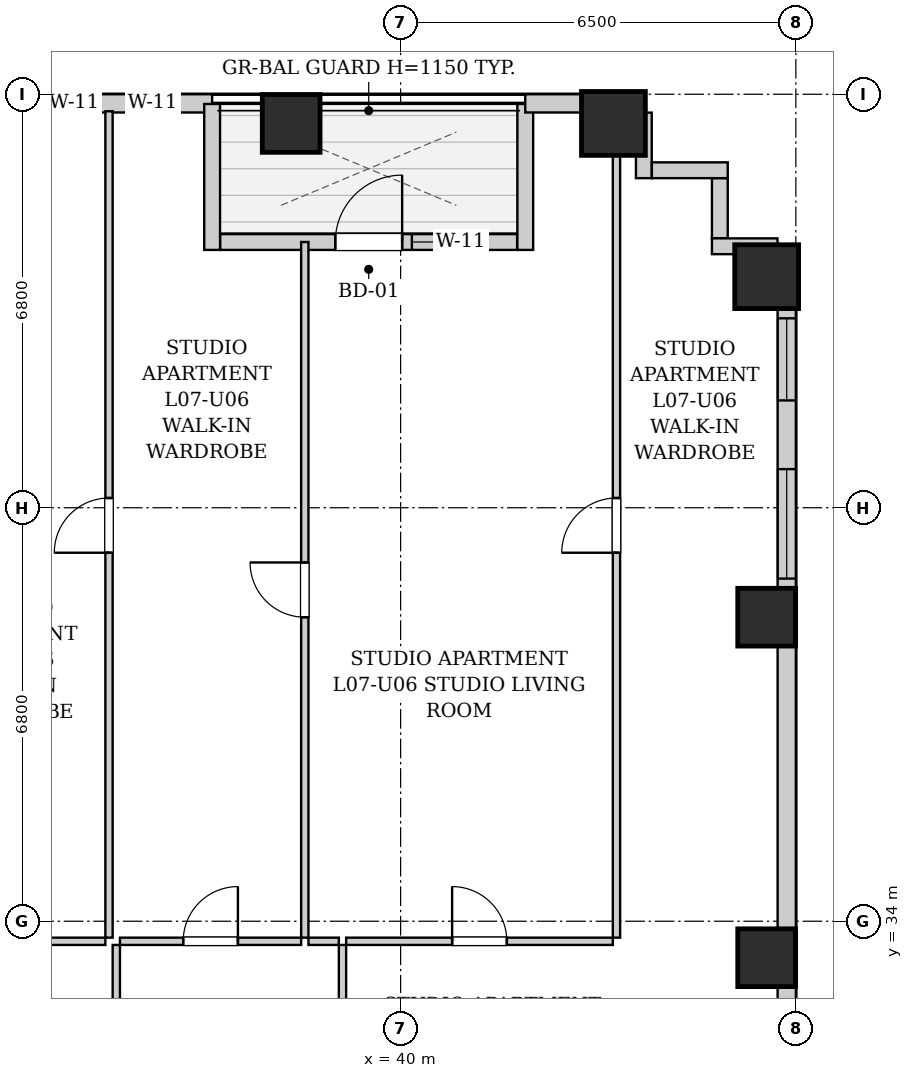
"""IFC4 building model, lengths in metres.
Left out: names, types, materials, properties, quantities, classifications, styles, units other than length and angle.
Written with IfcOpenShell. Run it as: python <this file> out.ifc"""

import sys

from ifc_helpers import new_model, si_unit, direction, frame, frame_2d, origin, origin_2d, place, context, subcontext, project, spatial, rectangle, extrude, element, fill, save


model = new_model("IFC4")
c1 = context("Model", 3, precision=1e-05, world=origin(), true_north=direction((0.0, 1.0)))
c2 = subcontext(c1, "Body", "Model", "MODEL_VIEW")
j1 = project(units=[si_unit("LENGTHUNIT", "METRE"), si_unit("PLANEANGLEUNIT", "RADIAN")], contexts=[c1])
p1 = place(None, origin())
s1 = spatial("IfcSite", under=j1, at=p1, CompositionType="ELEMENT")
p2 = place(p1, origin())
s2 = spatial("IfcBuilding", under=s1, at=p2, CompositionType="ELEMENT")
p3 = place(p2, frame((0.0, 0.0, 32.2)))
s3 = spatial("IfcBuildingStorey", under=s2, at=p3, CompositionType="ELEMENT", Elevation=32.2)
p4 = place(p3, frame((38.2, 47.12, 0.0), z_axis=(0.0, 0.0, 1.0), x_axis=(1.0, 0.0, 0.0)))
e1 = element("IfcColumn", 1, at=p4, inside=s3, PredefinedType="COLUMN", context=c2, shape_type="SweptSolid", body=[
    extrude(rectangle(XDim=0.95, YDim=0.95, at=origin_2d()), origin(), (0.0, 0.0, 1.0), 3.2),
])
p5 = place(p3, frame((43.5, 47.12, 0.0), z_axis=(0.0, 0.0, 1.0), x_axis=(1.0, 0.0, 0.0)))
e2 = element("IfcColumn", 2, at=p5, inside=s3, PredefinedType="COLUMN", context=c2, shape_type="SweptSolid", body=[
    extrude(rectangle(XDim=1.05, YDim=1.05, at=origin_2d()), origin(), (0.0, 0.0, 1.0), 3.2),
])
for number, where, z_axis, x_axis in (
    (3, (46.02, 33.4, 0.0), (0.0, 0.0, 1.0), (1.0, 0.0, 0.0)),
    (4, (46.02, 39.0, 0.0), (0.0, 0.0, 1.0), (1.0, 0.0, 0.0)),
):
    element("IfcColumn", number, at=place(p3, frame(where, z_axis=z_axis, x_axis=x_axis)), inside=s3, PredefinedType="COLUMN", context=c2, shape_type="SweptSolid", body=[
        extrude(rectangle(XDim=0.95, YDim=0.95, at=origin_2d()), origin(), (0.0, 0.0, 1.0), 3.2),
    ])
p6 = place(p3, frame((46.02, 44.6, 0.0), z_axis=(0.0, 0.0, 1.0), x_axis=(1.0, 0.0, 0.0)))
e5 = element("IfcColumn", 5, at=p6, inside=s3, PredefinedType="COLUMN", context=c2, shape_type="SweptSolid", body=[
    extrude(rectangle(XDim=1.05, YDim=1.05, at=origin_2d()), origin(), (0.0, 0.0, 1.0), 3.2),
])
p7 = place(p3, frame((10.0, 47.45, 0.0), z_axis=(0.0, 0.0, 1.0), x_axis=(1.0, 0.0, 0.0)))
e6 = element("IfcWall", 6, at=p7, inside=s3, PredefinedType="SOLIDWALL", context=c2, shape_type="SweptSolid", body=[
    extrude(rectangle(XDim=26.9, YDim=0.3, at=frame_2d((13.45, 0.0))), origin(), (0.0, 0.0, 1.0), 1.975),
])
p8 = place(p7, frame((5.815, 0.0, 0.55)))
e7 = element("IfcOpeningElement", 7, at=p8, cuts=e6, PredefinedType="OPENING", context=c2, shape_type="SweptSolid", body=[
    extrude(rectangle(XDim=1.35, YDim=1.2, at=frame_2d((0.675, 0.6))), frame((0.0, 0.16, 0.0), z_axis=(0.0, -1.0, 0.0), x_axis=(1.0, 0.0, 0.0)), (0.0, 0.0, 1.0), 0.32),
])
p9 = place(p7, frame((9.694, 0.0, 0.55)))
e8 = element("IfcOpeningElement", 8, at=p9, cuts=e6, PredefinedType="OPENING", context=c2, shape_type="SweptSolid", body=[
    extrude(rectangle(XDim=1.8, YDim=1.2, at=frame_2d((0.9, 0.6))), frame((0.0, 0.16, 0.0), z_axis=(0.0, -1.0, 0.0), x_axis=(1.0, 0.0, 0.0)), (0.0, 0.0, 1.0), 0.32),
])
p10 = place(p7, frame((17.5, 0.0, 0.55)))
e9 = element("IfcOpeningElement", 9, at=p10, cuts=e6, PredefinedType="OPENING", context=c2, shape_type="SweptSolid", body=[
    extrude(rectangle(XDim=0.85, YDim=1.2, at=frame_2d((0.425, 0.6))), frame((0.0, 0.16, 0.0), z_axis=(0.0, -1.0, 0.0), x_axis=(1.0, 0.0, 0.0)), (0.0, 0.0, 1.0), 0.32),
])
p11 = place(p7, frame((19.463, 0.0, 0.55)))
e10 = element("IfcOpeningElement", 10, at=p11, cuts=e6, PredefinedType="OPENING", context=c2, shape_type="SweptSolid", body=[
    extrude(rectangle(XDim=1.8, YDim=1.2, at=frame_2d((0.9, 0.6))), frame((0.0, 0.16, 0.0), z_axis=(0.0, -1.0, 0.0), x_axis=(1.0, 0.0, 0.0)), (0.0, 0.0, 1.0), 0.32),
])
p12 = place(p7, frame((23.835, 0.0, 0.55)))
e11 = element("IfcOpeningElement", 11, at=p12, cuts=e6, PredefinedType="OPENING", context=c2, shape_type="SweptSolid", body=[
    extrude(rectangle(XDim=0.85, YDim=1.2, at=frame_2d((0.425, 0.6))), frame((0.0, 0.16, 0.0), z_axis=(0.0, -1.0, 0.0), x_axis=(1.0, 0.0, 0.0)), (0.0, 0.0, 1.0), 0.32),
])
p13 = place(p7, frame((25.498, 0.0, 0.55)))
e12 = element("IfcOpeningElement", 12, at=p13, cuts=e6, PredefinedType="OPENING", context=c2, shape_type="SweptSolid", body=[
    extrude(rectangle(XDim=0.85, YDim=1.2, at=frame_2d((0.425, 0.6))), frame((0.0, 0.16, 0.0), z_axis=(0.0, -1.0, 0.0), x_axis=(1.0, 0.0, 0.0)), (0.0, 0.0, 1.0), 0.32),
])
p14 = place(p3, frame((36.9, 47.44, 0.0), z_axis=(0.0, 0.0, 1.0), x_axis=(0.0, -1.0, 0.0)))
e13 = element("IfcWall", 13, at=p14, inside=s3, PredefinedType="SOLIDWALL", context=c2, shape_type="SweptSolid", body=[
    extrude(rectangle(XDim=2.4, YDim=0.26, at=frame_2d((1.2, 0.0))), origin(), (0.0, 0.0, 1.0), 2.94),
])
p15 = place(p3, frame((37.034, 45.17, 0.0), z_axis=(0.0, 0.0, 1.0), x_axis=(1.0, 0.0, 0.0)))
e14 = element("IfcWall", 14, at=p15, inside=s3, PredefinedType="SOLIDWALL", context=c2, shape_type="SweptSolid", body=[
    extrude(rectangle(XDim=4.882, YDim=0.26, at=frame_2d((2.441, 0.0))), origin(), (0.0, 0.0, 1.0), 2.94),
])
p16 = place(p15, frame((1.891, 0.0, 0.0)))
e15 = element("IfcOpeningElement", 15, at=p16, cuts=e14, PredefinedType="OPENING", context=c2, shape_type="SweptSolid", body=[
    extrude(rectangle(XDim=1.1, YDim=2.0, at=frame_2d((0.55, 1.0))), frame((0.0, 0.14, 0.0), z_axis=(0.0, -1.0, 0.0), x_axis=(1.0, 0.0, 0.0)), (0.0, 0.0, 1.0), 0.28),
])
p17 = place(p15, frame((3.151, 0.0, 0.55)))
e16 = element("IfcOpeningElement", 16, at=p17, cuts=e14, PredefinedType="OPENING", context=c2, shape_type="SweptSolid", body=[
    extrude(rectangle(XDim=0.85, YDim=1.2, at=frame_2d((0.425, 0.6))), frame((0.0, 0.14, 0.0), z_axis=(0.0, -1.0, 0.0), x_axis=(1.0, 0.0, 0.0)), (0.0, 0.0, 1.0), 0.28),
])
p18 = place(p3, frame((42.05, 45.04, 0.0), z_axis=(0.0, 0.0, 1.0), x_axis=(0.0, 1.0, 0.0)))
e17 = element("IfcWall", 17, at=p18, inside=s3, PredefinedType="SOLIDWALL", context=c2, shape_type="SweptSolid", body=[
    extrude(rectangle(XDim=2.4, YDim=0.26, at=frame_2d((1.2, 0.0))), origin(), (0.0, 0.0, 1.0), 2.94),
])
p19 = place(p3, frame((42.05, 47.45, 0.0), z_axis=(0.0, 0.0, 1.0), x_axis=(1.0, 0.0, 0.0)))
e18 = element("IfcWall", 18, at=p19, inside=s3, PredefinedType="SOLIDWALL", context=c2, shape_type="SweptSolid", body=[
    extrude(rectangle(XDim=1.95, YDim=0.3, at=frame_2d((0.975, 0.0))), origin(), (0.0, 0.0, 1.0), 1.975),
])
p20 = place(p3, frame((46.35, 45.1, 0.0), z_axis=(0.0, 0.0, 1.0), x_axis=(0.0, -1.0, 0.0)))
e19 = element("IfcWall", 19, at=p20, inside=s3, PredefinedType="SOLIDWALL", context=c2, shape_type="SweptSolid", body=[
    extrude(rectangle(XDim=16.9, YDim=0.3, at=frame_2d((8.45, 0.0))), origin(), (0.0, 0.0, 1.0), 1.975),
])
p21 = place(p20, frame((3.665, 0.0, 0.55)))
e20 = element("IfcOpeningElement", 20, at=p21, cuts=e19, PredefinedType="OPENING", context=c2, shape_type="SweptSolid", body=[
    extrude(rectangle(XDim=1.8, YDim=1.2, at=frame_2d((0.9, 0.6))), frame((0.0, 0.16, 0.0), z_axis=(0.0, -1.0, 0.0), x_axis=(1.0, 0.0, 0.0)), (0.0, 0.0, 1.0), 0.32),
])
p22 = place(p20, frame((1.185, 0.0, 0.55)))
e21 = element("IfcOpeningElement", 21, at=p22, cuts=e19, PredefinedType="OPENING", context=c2, shape_type="SweptSolid", body=[
    extrude(rectangle(XDim=1.35, YDim=1.2, at=frame_2d((0.675, 0.6))), frame((0.0, 0.16, 0.0), z_axis=(0.0, -1.0, 0.0), x_axis=(1.0, 0.0, 0.0)), (0.0, 0.0, 1.0), 0.32),
])
p23 = place(p3, frame((44.0, 47.298, 0.0), z_axis=(0.0, 0.0, 1.0), x_axis=(0.0, -1.0, 0.0)))
e22 = element("IfcWall", 22, at=p23, inside=s3, PredefinedType="SOLIDWALL", context=c2, shape_type="SweptSolid", body=[
    extrude(rectangle(XDim=1.078, YDim=0.26, at=frame_2d((0.539, 0.0))), origin(), (0.0, 0.0, 1.0), 2.94),
])
p24 = place(p3, frame((44.132, 46.35, 0.0), z_axis=(0.0, 0.0, 1.0), x_axis=(1.0, 0.0, 0.0)))
e23 = element("IfcWall", 23, at=p24, inside=s3, PredefinedType="SOLIDWALL", context=c2, shape_type="SweptSolid", body=[
    extrude(rectangle(XDim=1.248, YDim=0.26, at=frame_2d((0.624, 0.0))), origin(), (0.0, 0.0, 1.0), 2.94),
])
p25 = place(p3, frame((45.25, 46.218, 0.0), z_axis=(0.0, 0.0, 1.0), x_axis=(0.0, -1.0, 0.0)))
e24 = element("IfcWall", 24, at=p25, inside=s3, PredefinedType="SOLIDWALL", context=c2, shape_type="SweptSolid", body=[
    extrude(rectangle(XDim=0.986, YDim=0.26, at=frame_2d((0.493, 0.0))), origin(), (0.0, 0.0, 1.0), 2.94),
])
p26 = place(p3, frame((45.12, 45.1, 0.0), z_axis=(0.0, 0.0, 1.0), x_axis=(1.0, 0.0, 0.0)))
e25 = element("IfcWall", 25, at=p26, inside=s3, PredefinedType="SOLIDWALL", context=c2, shape_type="SweptSolid", body=[
    extrude(rectangle(XDim=1.078, YDim=0.26, at=frame_2d((0.539, 0.0))), origin(), (0.0, 0.0, 1.0), 2.94),
])
p27 = place(p3, frame((35.324, 30.76, 0.0), z_axis=(0.0, 0.0, 1.0), x_axis=(0.0, 1.0, 0.0)))
e26 = element("IfcWall", 26, at=p27, inside=s3, PredefinedType="PARTITIONING", context=c2, shape_type="SweptSolid", body=[
    extrude(rectangle(XDim=2.85, YDim=0.12, at=frame_2d((1.425, 0.0))), origin(), (0.0, 0.0, 1.0), 2.94),
])
p28 = place(p27, frame((0.975, 0.0, 0.0)))
e27 = element("IfcOpeningElement", 27, at=p28, cuts=e26, PredefinedType="OPENING", context=c2, shape_type="SweptSolid", body=[
    extrude(rectangle(XDim=0.9, YDim=2.05, at=frame_2d((0.45, 1.025))), frame((0.0, 0.07, 0.0), z_axis=(0.0, -1.0, 0.0), x_axis=(1.0, 0.0, 0.0)), (0.0, 0.0, 1.0), 0.14),
])
p29 = place(p3, frame((32.044, 33.67, 0.0), z_axis=(0.0, 0.0, 1.0), x_axis=(1.0, 0.0, 0.0)))
e28 = element("IfcWall", 28, at=p29, inside=s3, PredefinedType="PARTITIONING", context=c2, shape_type="SweptSolid", body=[
    extrude(rectangle(XDim=3.1, YDim=0.12, at=frame_2d((1.55, 0.0))), origin(), (0.0, 0.0, 1.0), 2.94),
])
p30 = place(p29, frame((1.1, 0.0, 0.0)))
e29 = element("IfcOpeningElement", 29, at=p30, cuts=e28, PredefinedType="OPENING", context=c2, shape_type="SweptSolid", body=[
    extrude(rectangle(XDim=0.9, YDim=2.05, at=frame_2d((0.45, 1.025))), frame((0.0, 0.07, 0.0), z_axis=(0.0, -1.0, 0.0), x_axis=(1.0, 0.0, 0.0)), (0.0, 0.0, 1.0), 0.14),
])
p31 = place(p3, frame((39.044, 30.76, 0.0), z_axis=(0.0, 0.0, 1.0), x_axis=(0.0, 1.0, 0.0)))
e30 = element("IfcWall", 30, at=p31, inside=s3, PredefinedType="PARTITIONING", context=c2, shape_type="SweptSolid", body=[
    extrude(rectangle(XDim=2.85, YDim=0.12, at=frame_2d((1.425, 0.0))), origin(), (0.0, 0.0, 1.0), 2.94),
])
p32 = place(p31, frame((0.975, 0.0, 0.0)))
e31 = element("IfcOpeningElement", 31, at=p32, cuts=e30, PredefinedType="OPENING", context=c2, shape_type="SweptSolid", body=[
    extrude(rectangle(XDim=0.9, YDim=2.05, at=frame_2d((0.45, 1.025))), frame((0.0, 0.07, 0.0), z_axis=(0.0, -1.0, 0.0), x_axis=(1.0, 0.0, 0.0)), (0.0, 0.0, 1.0), 0.14),
])
p33 = place(p3, frame((35.384, 33.67, 0.0), z_axis=(0.0, 0.0, 1.0), x_axis=(1.0, 0.0, 0.0)))
e32 = element("IfcWall", 32, at=p33, inside=s3, PredefinedType="PARTITIONING", context=c2, shape_type="SweptSolid", body=[
    extrude(rectangle(XDim=2.98, YDim=0.12, at=frame_2d((1.49, 0.0))), origin(), (0.0, 0.0, 1.0), 2.94),
])
p34 = place(p33, frame((1.04, 0.0, 0.0)))
e33 = element("IfcOpeningElement", 33, at=p34, cuts=e32, PredefinedType="OPENING", context=c2, shape_type="SweptSolid", body=[
    extrude(rectangle(XDim=0.9, YDim=2.05, at=frame_2d((0.45, 1.025))), frame((0.0, 0.07, 0.0), z_axis=(0.0, -1.0, 0.0), x_axis=(1.0, 0.0, 0.0)), (0.0, 0.0, 1.0), 0.14),
])
p35 = place(p3, frame((38.484, 33.67, 0.0), z_axis=(0.0, 0.0, 1.0), x_axis=(1.0, 0.0, 0.0)))
e34 = element("IfcWall", 34, at=p35, inside=s3, PredefinedType="PARTITIONING", context=c2, shape_type="SweptSolid", body=[
    extrude(rectangle(XDim=0.5, YDim=0.12, at=frame_2d((0.25, 0.0))), origin(), (0.0, 0.0, 1.0), 2.94),
])
p36 = place(p3, frame((39.104, 33.67, 0.0), z_axis=(0.0, 0.0, 1.0), x_axis=(1.0, 0.0, 0.0)))
e35 = element("IfcWall", 35, at=p36, inside=s3, PredefinedType="PARTITIONING", context=c2, shape_type="SweptSolid", body=[
    extrude(rectangle(XDim=4.386, YDim=0.12, at=frame_2d((2.193, 0.0))), origin(), (0.0, 0.0, 1.0), 2.94),
])
p37 = place(p36, frame((1.743, 0.0, 0.0)))
e36 = element("IfcOpeningElement", 36, at=p37, cuts=e35, PredefinedType="OPENING", context=c2, shape_type="SweptSolid", body=[
    extrude(rectangle(XDim=0.9, YDim=2.05, at=frame_2d((0.45, 1.025))), frame((0.0, 0.07, 0.0), z_axis=(0.0, -1.0, 0.0), x_axis=(1.0, 0.0, 0.0)), (0.0, 0.0, 1.0), 0.14),
])
p38 = place(p3, frame((35.204, 33.73, 0.0), z_axis=(0.0, 0.0, 1.0), x_axis=(0.0, 1.0, 0.0)))
e37 = element("IfcWall", 37, at=p38, inside=s3, PredefinedType="PARTITIONING", context=c2, shape_type="SweptSolid", body=[
    extrude(rectangle(XDim=13.59, YDim=0.12, at=frame_2d((6.795, 0.0))), origin(), (0.0, 0.0, 1.0), 2.94),
])
p39 = place(p38, frame((6.33, 0.0, 0.0)))
e38 = element("IfcOpeningElement", 38, at=p39, cuts=e37, PredefinedType="OPENING", context=c2, shape_type="SweptSolid", body=[
    extrude(rectangle(XDim=0.9, YDim=2.05, at=frame_2d((0.45, 1.025))), frame((0.0, 0.07, 0.0), z_axis=(0.0, -1.0, 0.0), x_axis=(1.0, 0.0, 0.0)), (0.0, 0.0, 1.0), 0.14),
])
p40 = place(p3, frame((38.424, 33.73, 0.0), z_axis=(0.0, 0.0, 1.0), x_axis=(0.0, 1.0, 0.0)))
e39 = element("IfcWall", 39, at=p40, inside=s3, PredefinedType="PARTITIONING", context=c2, shape_type="SweptSolid", body=[
    extrude(rectangle(XDim=11.44, YDim=0.12, at=frame_2d((5.72, 0.0))), origin(), (0.0, 0.0, 1.0), 2.94),
])
p41 = place(p40, frame((5.27, 0.0, 0.0)))
e40 = element("IfcOpeningElement", 40, at=p41, cuts=e39, PredefinedType="OPENING", context=c2, shape_type="SweptSolid", body=[
    extrude(rectangle(XDim=0.9, YDim=2.05, at=frame_2d((0.45, 1.025))), frame((0.0, 0.07, 0.0), z_axis=(0.0, -1.0, 0.0), x_axis=(1.0, 0.0, 0.0)), (0.0, 0.0, 1.0), 0.14),
])
p42 = place(p3, frame((43.55, 33.73, 0.0), z_axis=(0.0, 0.0, 1.0), x_axis=(0.0, 1.0, 0.0)))
e41 = element("IfcWall", 41, at=p42, inside=s3, PredefinedType="PARTITIONING", context=c2, shape_type="SweptSolid", body=[
    extrude(rectangle(XDim=13.59, YDim=0.12, at=frame_2d((6.795, 0.0))), origin(), (0.0, 0.0, 1.0), 2.94),
])
p43 = place(p42, frame((6.33, 0.0, 0.0)))
e42 = element("IfcOpeningElement", 42, at=p43, cuts=e41, PredefinedType="OPENING", context=c2, shape_type="SweptSolid", body=[
    extrude(rectangle(XDim=0.9, YDim=2.05, at=frame_2d((0.45, 1.025))), frame((0.0, 0.07, 0.0), z_axis=(0.0, -1.0, 0.0), x_axis=(1.0, 0.0, 0.0)), (0.0, 0.0, 1.0), 0.14),
])
p44 = place(p34, origin())
e43 = element("IfcDoor", 43, at=p44, inside=s3, OperationType="SINGLE_SWING_RIGHT", PredefinedType="DOOR", context=c2, shape_type="SweptSolid", body=[
    extrude(rectangle(XDim=0.9, YDim=2.05, at=frame_2d((0.45, 1.025))), frame((0.0, 0.025, 0.0), z_axis=(0.0, -1.0, 0.0), x_axis=(1.0, 0.0, 0.0)), (0.0, 0.0, 1.0), 0.05),
])
fill(e33, e43)
p45 = place(p37, origin())
e44 = element("IfcDoor", 44, at=p45, inside=s3, OperationType="SINGLE_SWING_LEFT", PredefinedType="DOOR", context=c2, shape_type="SweptSolid", body=[
    extrude(rectangle(XDim=0.9, YDim=2.05, at=frame_2d((0.45, 1.025))), frame((0.0, 0.025, 0.0), z_axis=(0.0, -1.0, 0.0), x_axis=(1.0, 0.0, 0.0)), (0.0, 0.0, 1.0), 0.05),
])
fill(e36, e44)
p46 = place(p39, origin())
e45 = element("IfcDoor", 45, at=p46, inside=s3, OperationType="SINGLE_SWING_LEFT", PredefinedType="DOOR", context=c2, shape_type="SweptSolid", body=[
    extrude(rectangle(XDim=0.9, YDim=2.05, at=frame_2d((0.45, 1.025))), frame((0.0, 0.025, 0.0), z_axis=(0.0, -1.0, 0.0), x_axis=(1.0, 0.0, 0.0)), (0.0, 0.0, 1.0), 0.05),
])
fill(e38, e45)
p47 = place(p41, origin())
e46 = element("IfcDoor", 46, at=p47, inside=s3, OperationType="SINGLE_SWING_RIGHT", PredefinedType="DOOR", context=c2, shape_type="SweptSolid", body=[
    extrude(rectangle(XDim=0.9, YDim=2.05, at=frame_2d((0.45, 1.025))), frame((0.0, 0.025, 0.0), z_axis=(0.0, -1.0, 0.0), x_axis=(1.0, 0.0, 0.0)), (0.0, 0.0, 1.0), 0.05),
])
fill(e40, e46)
p48 = place(p43, origin())
e47 = element("IfcDoor", 47, at=p48, inside=s3, OperationType="SINGLE_SWING_LEFT", PredefinedType="DOOR", context=c2, shape_type="SweptSolid", body=[
    extrude(rectangle(XDim=0.9, YDim=2.05, at=frame_2d((0.45, 1.025))), frame((0.0, 0.025, 0.0), z_axis=(0.0, -1.0, 0.0), x_axis=(1.0, 0.0, 0.0)), (0.0, 0.0, 1.0), 0.05),
])
fill(e42, e47)
p49 = place(p16, origin())
e48 = element("IfcDoor", 48, at=p49, inside=s3, OperationType="SINGLE_SWING_RIGHT", PredefinedType="DOOR", context=c2, shape_type="SweptSolid", body=[
    extrude(rectangle(XDim=1.1, YDim=2.0, at=frame_2d((0.55, 1.0))), frame((0.0, 0.025, 0.0), z_axis=(0.0, -1.0, 0.0), x_axis=(1.0, 0.0, 0.0)), (0.0, 0.0, 1.0), 0.05),
])
fill(e15, e48)
p50 = place(p12, origin())
e49 = element("IfcWindow", 49, at=p50, inside=s3, PartitioningType="SINGLE_PANEL", PredefinedType="WINDOW", context=c2, shape_type="SweptSolid", body=[
    extrude(rectangle(XDim=0.85, YDim=1.2, at=frame_2d((0.425, 0.6))), frame((0.0, 0.03, 0.0), z_axis=(0.0, -1.0, 0.0), x_axis=(1.0, 0.0, 0.0)), (0.0, 0.0, 1.0), 0.06),
])
fill(e11, e49)
p51 = place(p13, origin())
e50 = element("IfcWindow", 50, at=p51, inside=s3, PartitioningType="SINGLE_PANEL", PredefinedType="WINDOW", context=c2, shape_type="SweptSolid", body=[
    extrude(rectangle(XDim=0.85, YDim=1.2, at=frame_2d((0.425, 0.6))), frame((0.0, 0.03, 0.0), z_axis=(0.0, -1.0, 0.0), x_axis=(1.0, 0.0, 0.0)), (0.0, 0.0, 1.0), 0.06),
])
fill(e12, e50)
p52 = place(p17, origin())
e51 = element("IfcWindow", 51, at=p52, inside=s3, PartitioningType="SINGLE_PANEL", PredefinedType="WINDOW", context=c2, shape_type="SweptSolid", body=[
    extrude(rectangle(XDim=0.85, YDim=1.2, at=frame_2d((0.425, 0.6))), frame((0.0, 0.03, 0.0), z_axis=(0.0, -1.0, 0.0), x_axis=(1.0, 0.0, 0.0)), (0.0, 0.0, 1.0), 0.06),
])
fill(e16, e51)
p53 = place(p21, origin())
e52 = element("IfcWindow", 52, at=p53, inside=s3, PartitioningType="DOUBLE_PANEL_VERTICAL", PredefinedType="WINDOW", context=c2, shape_type="SweptSolid", body=[
    extrude(rectangle(XDim=1.8, YDim=1.2, at=frame_2d((0.9, 0.6))), frame((0.0, 0.03, 0.0), z_axis=(0.0, -1.0, 0.0), x_axis=(1.0, 0.0, 0.0)), (0.0, 0.0, 1.0), 0.06),
])
fill(e20, e52)
p54 = place(p22, origin())
e53 = element("IfcWindow", 53, at=p54, inside=s3, PartitioningType="SINGLE_PANEL", PredefinedType="WINDOW", context=c2, shape_type="SweptSolid", body=[
    extrude(rectangle(XDim=1.35, YDim=1.2, at=frame_2d((0.675, 0.6))), frame((0.0, 0.03, 0.0), z_axis=(0.0, -1.0, 0.0), x_axis=(1.0, 0.0, 0.0)), (0.0, 0.0, 1.0), 0.06),
])
fill(e21, e53)
save(model, sys.argv[1])
